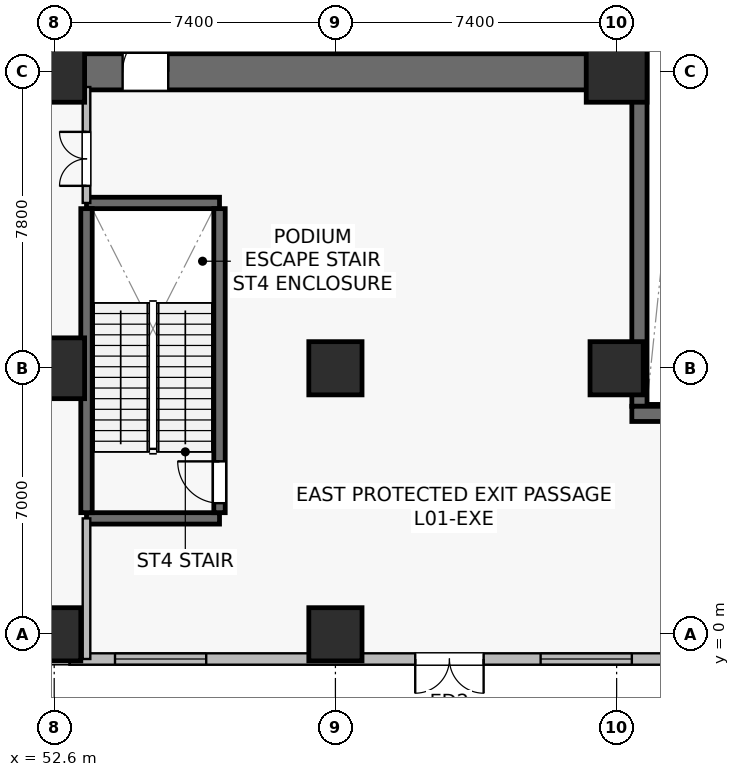
"""IFC4 building model, lengths in metres.
Left out: names, types, materials, properties, quantities, classifications, styles, units other than length and angle.
Written with IfcOpenShell. Run it as: python <this file> out.ifc"""

import sys

from ifc_helpers import new_model, si_unit, direction, frame, frame_2d, origin, origin_2d, place, context, subcontext, project, spatial, rectangle, extrude, source, transform, mapped, element, fill, save


model = new_model("IFC4")
c1 = context("Model", 3, precision=1e-05, world=origin(), true_north=direction((0.0, 1.0)))
c2 = subcontext(c1, "Body", "Model", "MODEL_VIEW")
j1 = project(units=[si_unit("LENGTHUNIT", "METRE"), si_unit("PLANEANGLEUNIT", "RADIAN")], contexts=[c1])
p1 = place(None, origin())
s1 = spatial("IfcSite", under=j1, at=p1, CompositionType="ELEMENT")
p2 = place(p1, origin())
s2 = spatial("IfcBuilding", under=s1, at=p2, CompositionType="ELEMENT")
p3 = place(p2, origin())
s3 = spatial("IfcBuildingStorey", under=s2, at=p3, CompositionType="ELEMENT", Elevation=0.0)
p4 = place(p3, frame((52.125, 14.8, 0.0), z_axis=(0.0, 0.0, 1.0), x_axis=(1.0, 0.0, 0.0)))
e1 = element("IfcWall", 1, at=p4, inside=s3, PredefinedType="SHEAR", context=c2, shape_type="SweptSolid", body=[
    extrude(rectangle(XDim=15.75, YDim=0.95, at=frame_2d((7.875, 0.0))), origin(), (0.0, 0.0, 1.0), 5.05),
])
p5 = place(p4, frame((2.275, 0.0, 0.0)))
e2 = element("IfcOpeningElement", 2, at=p5, cuts=e1, PredefinedType="OPENING", context=c2, shape_type="SweptSolid", body=[
    extrude(rectangle(XDim=1.2, YDim=2.16, at=frame_2d((0.6, 1.08))), frame((0.0, 0.485, 0.0), z_axis=(0.0, -1.0, 0.0), x_axis=(1.0, 0.0, 0.0)), (0.0, 0.0, 1.0), 0.97),
])
p6 = place(p3, frame((52.6, 15.275, 0.0), z_axis=(0.0, 0.0, 1.0), x_axis=(0.0, 1.0, 0.0)))
e3 = element("IfcWall", 3, at=p6, inside=s3, PredefinedType="SHEAR", context=c2, shape_type="SweptSolid", body=[
    extrude(rectangle(XDim=18.05, YDim=0.95, at=frame_2d((9.025, 0.0))), origin(), (0.0, 0.0, 1.0), 5.05),
])
p7 = place(p6, frame((3.275, 0.0, 0.0)))
e4 = element("IfcOpeningElement", 4, at=p7, cuts=e3, PredefinedType="OPENING", context=c2, shape_type="SweptSolid", body=[
    extrude(rectangle(XDim=1.42, YDim=2.2, at=frame_2d((0.71, 1.1))), frame((0.0, 0.485, 0.0), z_axis=(0.0, -1.0, 0.0), x_axis=(1.0, 0.0, 0.0)), (0.0, 0.0, 1.0), 0.97),
])
p8 = place(p3, frame((67.4, 15.275, 0.0), z_axis=(0.0, 0.0, 1.0), x_axis=(0.0, 1.0, 0.0)))
e5 = element("IfcWall", 5, at=p8, inside=s3, PredefinedType="SHEAR", context=c2, shape_type="SweptSolid", body=[
    extrude(rectangle(XDim=18.05, YDim=0.95, at=frame_2d((9.025, 0.0))), origin(), (0.0, 0.0, 1.0), 5.05),
])
for number, where, z_axis, x_axis in (
    (6, (53.45, 3.05, 0.0), (0.0, 0.0, 1.0), (1.0, 0.0, 0.0)),
    (7, (53.45, 11.35, 0.0), (0.0, 0.0, 1.0), (1.0, 0.0, 0.0)),
):
    element("IfcWall", number, at=place(p3, frame(where, z_axis=z_axis, x_axis=x_axis)), inside=s3, PredefinedType="SHEAR", context=c2, shape_type="SweptSolid", body=[
        extrude(rectangle(XDim=3.5, YDim=0.3, at=frame_2d((1.75, 0.0))), origin(), (0.0, 0.0, 1.0), 5.05),
    ])
p9 = place(p3, frame((53.45, 3.2, 0.0), z_axis=(0.0, 0.0, 1.0), x_axis=(0.0, 1.0, 0.0)))
e8 = element("IfcWall", 8, at=p9, inside=s3, PredefinedType="SHEAR", context=c2, shape_type="SweptSolid", body=[
    extrude(rectangle(XDim=8.0, YDim=0.3, at=frame_2d((4.0, 0.0))), origin(), (0.0, 0.0, 1.0), 5.05),
])
p10 = place(p3, frame((56.95, 3.2, 0.0), z_axis=(0.0, 0.0, 1.0), x_axis=(0.0, 1.0, 0.0)))
e9 = element("IfcWall", 9, at=p10, inside=s3, PredefinedType="SHEAR", context=c2, shape_type="SweptSolid", body=[
    extrude(rectangle(XDim=8.0, YDim=0.3, at=frame_2d((4.0, 0.0))), origin(), (0.0, 0.0, 1.0), 5.05),
])
p11 = place(p10, frame((0.25, 0.0, 0.0)))
e10 = element("IfcOpeningElement", 10, at=p11, cuts=e9, PredefinedType="OPENING", context=c2, shape_type="SweptSolid", body=[
    extrude(rectangle(XDim=1.1, YDim=2.15, at=frame_2d((0.55, 1.075))), frame((0.0, 0.16, 0.0), z_axis=(0.0, -1.0, 0.0), x_axis=(1.0, 0.0, 0.0)), (0.0, 0.0, 1.0), 0.32),
])
p12 = place(p3, frame((68.0, 6.0, 0.0), z_axis=(0.0, 0.0, 1.0), x_axis=(0.0, 1.0, 0.0)))
e11 = element("IfcWall", 11, at=p12, inside=s3, PredefinedType="SHEAR", context=c2, shape_type="SweptSolid", body=[
    extrude(rectangle(XDim=43.0, YDim=0.4, at=frame_2d((21.5, 0.0))), origin(), (0.0, 0.0, 1.0), 5.05),
])
p13 = place(p3, frame((67.8, 5.8, 0.0), z_axis=(0.0, 0.0, 1.0), x_axis=(1.0, 0.0, 0.0)))
e12 = element("IfcWall", 12, at=p13, inside=s3, PredefinedType="SHEAR", context=c2, shape_type="SweptSolid", body=[
    extrude(rectangle(XDim=5.0, YDim=0.4, at=frame_2d((2.5, 0.0))), origin(), (0.0, 0.0, 1.0), 5.05),
])
m1 = source(origin(), c2, "Body", "SweptSolid", [
    extrude(rectangle(XDim=1.6, YDim=1.6, at=origin_2d()), origin(), (0.0, 0.0, 1.0), 5.4),
])
p14 = place(p3, frame((52.6, 7.0, 0.0), z_axis=(0.0, 0.0, 1.0), x_axis=(1.0, 0.0, 0.0)))
e13 = element("IfcColumn", 13, at=p14, inside=s3, PredefinedType="COLUMN", context=c2, shape_type="MappedRepresentation", body=[
    mapped(m1, transform((0.0, 0.0, 0.0), scale=1.0)),
])
m2 = source(origin(), c2, "Body", "SweptSolid", [
    extrude(rectangle(XDim=1.4, YDim=1.4, at=origin_2d()), origin(), (0.0, 0.0, 1.0), 5.4),
])
p15 = place(p3, frame((60.0, 7.0, 0.0), z_axis=(0.0, 0.0, 1.0), x_axis=(1.0, 0.0, 0.0)))
e14 = element("IfcColumn", 14, at=p15, inside=s3, PredefinedType="COLUMN", context=c2, shape_type="MappedRepresentation", body=[
    mapped(m2, transform((0.0, 0.0, 0.0), scale=1.0)),
])
for number, where, z_axis, x_axis in (
    (15, (52.6, 14.8, 0.0), (0.0, 0.0, 1.0), (1.0, 0.0, 0.0)),
    (16, (67.4, 14.8, 0.0), (0.0, 0.0, 1.0), (1.0, 0.0, 0.0)),
):
    element("IfcColumn", number, at=place(p3, frame(where, z_axis=z_axis, x_axis=x_axis)), inside=s3, PredefinedType="COLUMN", context=c2, shape_type="MappedRepresentation", body=[
        mapped(m1, transform((0.0, 0.0, 0.0), scale=1.0)),
    ])
for number, where, z_axis, x_axis in (
    (17, (67.4, 7.0, 0.0), (0.0, 0.0, 1.0), (1.0, 0.0, 0.0)),
    (18, (52.6, 0.0, 0.0), (0.0, 0.0, 1.0), (1.0, 0.0, 0.0)),
    (19, (60.0, 0.0, 0.0), (0.0, 0.0, 1.0), (1.0, 0.0, 0.0)),
):
    element("IfcColumn", number, at=place(p3, frame(where, z_axis=z_axis, x_axis=x_axis)), inside=s3, PredefinedType="COLUMN", context=c2, shape_type="MappedRepresentation", body=[
        mapped(m2, transform((0.0, 0.0, 0.0), scale=1.0)),
    ])
p16 = place(p3, frame((73.0, -0.65, 0.0), z_axis=(0.0, 0.0, 1.0), x_axis=(-1.0, 0.0, 0.0)))
e20 = element("IfcWall", 20, at=p16, inside=s3, PredefinedType="STANDARD", context=c2, shape_type="SweptSolid", body=[
    extrude(rectangle(XDim=20.0, YDim=0.3, at=frame_2d((10.0, 0.0))), origin(), (0.0, 0.0, 1.0), 5.05),
])
p17 = place(p16, frame((9.1, 0.0, 0.0)))
e21 = element("IfcOpeningElement", 21, at=p17, cuts=e20, PredefinedType="OPENING", context=c2, shape_type="SweptSolid", body=[
    extrude(rectangle(XDim=1.8, YDim=2.3, at=frame_2d((0.9, 1.15))), frame((0.0, 0.16, 0.0), z_axis=(0.0, -1.0, 0.0), x_axis=(1.0, 0.0, 0.0)), (0.0, 0.0, 1.0), 0.32),
])
p18 = place(p16, frame((1.2, 0.0, 0.9)))
e22 = element("IfcOpeningElement", 22, at=p18, cuts=e20, PredefinedType="OPENING", context=c2, shape_type="SweptSolid", body=[
    extrude(rectangle(XDim=2.4, YDim=2.8, at=frame_2d((1.2, 1.4))), frame((0.0, 0.16, 0.0), z_axis=(0.0, -1.0, 0.0), x_axis=(1.0, 0.0, 0.0)), (0.0, 0.0, 1.0), 0.32),
])
p19 = place(p16, frame((5.2, 0.0, 0.9)))
e23 = element("IfcOpeningElement", 23, at=p19, cuts=e20, PredefinedType="OPENING", context=c2, shape_type="SweptSolid", body=[
    extrude(rectangle(XDim=2.4, YDim=2.8, at=frame_2d((1.2, 1.4))), frame((0.0, 0.16, 0.0), z_axis=(0.0, -1.0, 0.0), x_axis=(1.0, 0.0, 0.0)), (0.0, 0.0, 1.0), 0.32),
])
p20 = place(p16, frame((16.4, 0.0, 0.9)))
e24 = element("IfcOpeningElement", 24, at=p20, cuts=e20, PredefinedType="OPENING", context=c2, shape_type="SweptSolid", body=[
    extrude(rectangle(XDim=2.4, YDim=2.8, at=frame_2d((1.2, 1.4))), frame((0.0, 0.16, 0.0), z_axis=(0.0, -1.0, 0.0), x_axis=(1.0, 0.0, 0.0)), (0.0, 0.0, 1.0), 0.32),
])
p21 = place(p3, frame((53.45, -0.65, 0.0), z_axis=(0.0, 0.0, 1.0), x_axis=(0.0, 1.0, 0.0)))
e25 = element("IfcWall", 25, at=p21, inside=s3, PredefinedType="SOLIDWALL", context=c2, shape_type="SweptSolid", body=[
    extrude(rectangle(XDim=3.7, YDim=0.2, at=frame_2d((1.85, 0.0))), origin(), (0.0, 0.0, 1.0), 5.05),
])
p22 = place(p3, frame((53.45, 11.35, 0.0), z_axis=(0.0, 0.0, 1.0), x_axis=(0.0, 1.0, 0.0)))
e26 = element("IfcWall", 26, at=p22, inside=s3, PredefinedType="SOLIDWALL", context=c2, shape_type="SweptSolid", body=[
    extrude(rectangle(XDim=3.05, YDim=0.2, at=frame_2d((1.525, 0.0))), origin(), (0.0, 0.0, 1.0), 5.05),
])
p23 = place(p22, frame((0.45, 0.0, 0.0)))
e27 = element("IfcOpeningElement", 27, at=p23, cuts=e26, PredefinedType="OPENING", context=c2, shape_type="SweptSolid", body=[
    extrude(rectangle(XDim=1.42, YDim=2.2, at=frame_2d((0.71, 1.1))), frame((0.0, 0.11, 0.0), z_axis=(0.0, -1.0, 0.0), x_axis=(1.0, 0.0, 0.0)), (0.0, 0.0, 1.0), 0.22),
])
m3 = source(origin(), c2, "Body", "SweptSolid", [
    extrude(rectangle(XDim=1.8, YDim=2.3, at=frame_2d((0.9, 1.15))), frame((0.0, 0.025, 0.0), z_axis=(0.0, -1.0, 0.0), x_axis=(1.0, 0.0, 0.0)), (0.0, 0.0, 1.0), 0.05),
])
p24 = place(p17, origin())
e28 = element("IfcDoor", 28, at=p24, inside=s3, OperationType="DOUBLE_DOOR_SINGLE_SWING", PredefinedType="DOOR", context=c2, shape_type="MappedRepresentation", body=[
    mapped(m3, transform((0.0, 0.0, 0.0), scale=1.0)),
])
fill(e21, e28)
m4 = source(origin(), c2, "Body", "SweptSolid", [
    extrude(rectangle(XDim=2.4, YDim=2.8, at=frame_2d((1.2, 1.4))), frame((0.0, 0.03, 0.0), z_axis=(0.0, -1.0, 0.0), x_axis=(1.0, 0.0, 0.0)), (0.0, 0.0, 1.0), 0.06),
])
p25 = place(p19, origin())
e29 = element("IfcWindow", 29, at=p25, inside=s3, PartitioningType="SINGLE_PANEL", PredefinedType="WINDOW", context=c2, shape_type="MappedRepresentation", body=[
    mapped(m4, transform((0.0, 0.0, 0.0), scale=1.0)),
])
fill(e23, e29)
p26 = place(p20, origin())
e30 = element("IfcWindow", 30, at=p26, inside=s3, PartitioningType="SINGLE_PANEL", PredefinedType="WINDOW", context=c2, shape_type="MappedRepresentation", body=[
    mapped(m4, transform((0.0, 0.0, 0.0), scale=1.0)),
])
fill(e24, e30)
m5 = source(origin(), c2, "Body", "SweptSolid", [
    extrude(rectangle(XDim=1.2, YDim=2.16, at=frame_2d((0.6, 1.08))), frame((0.0, 0.025, 0.0), z_axis=(0.0, -1.0, 0.0), x_axis=(1.0, 0.0, 0.0)), (0.0, 0.0, 1.0), 0.05),
])
p27 = place(p5, origin())
e31 = element("IfcDoor", 31, at=p27, inside=s3, OperationType="SINGLE_SWING_RIGHT", PredefinedType="DOOR", context=c2, shape_type="MappedRepresentation", body=[
    mapped(m5, transform((0.0, 0.0, 0.0), scale=1.0)),
])
fill(e2, e31)
m6 = source(origin(), c2, "Body", "SweptSolid", [
    extrude(rectangle(XDim=1.1, YDim=2.15, at=frame_2d((0.55, 1.075))), frame((0.0, 0.025, 0.0), z_axis=(0.0, -1.0, 0.0), x_axis=(1.0, 0.0, 0.0)), (0.0, 0.0, 1.0), 0.05),
])
p28 = place(p11, origin())
e32 = element("IfcDoor", 32, at=p28, inside=s3, OperationType="SINGLE_SWING_RIGHT", PredefinedType="DOOR", context=c2, shape_type="MappedRepresentation", body=[
    mapped(m6, transform((0.0, 0.0, 0.0), scale=1.0)),
])
fill(e10, e32)
m7 = source(origin(), c2, "Body", "SweptSolid", [
    extrude(rectangle(XDim=1.42, YDim=2.2, at=frame_2d((0.71, 1.1))), frame((0.0, 0.025, 0.0), z_axis=(0.0, -1.0, 0.0), x_axis=(1.0, 0.0, 0.0)), (0.0, 0.0, 1.0), 0.05),
])
p29 = place(p23, origin())
e33 = element("IfcDoor", 33, at=p29, inside=s3, OperationType="DOUBLE_DOOR_SINGLE_SWING", PredefinedType="DOOR", context=c2, shape_type="MappedRepresentation", body=[
    mapped(m7, transform((0.0, 0.0, 0.0), scale=1.0)),
])
fill(e27, e33)
save(model, sys.argv[1])
